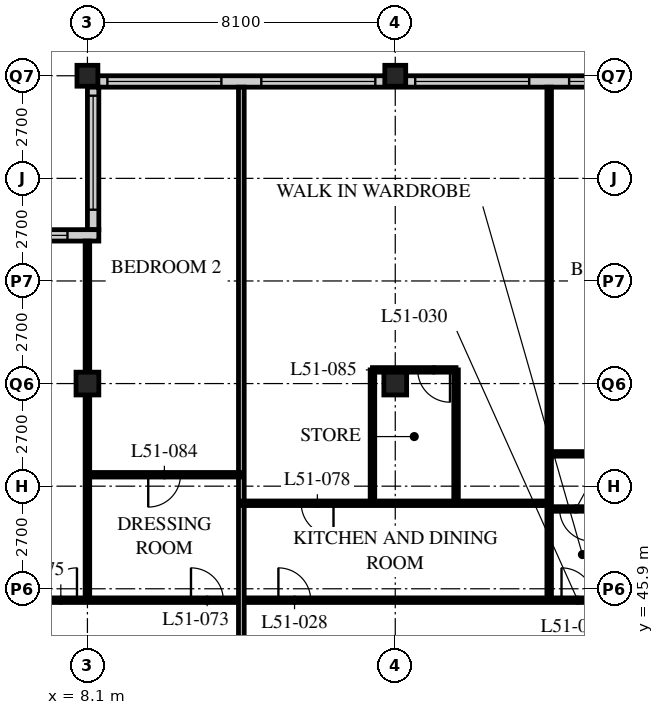
"""IFC4 building model, lengths in metres.
Left out: names, types, materials, properties, quantities, classifications, styles, units other than length and angle.
Written with IfcOpenShell. Run it as: python <this file> out.ifc"""

import sys

from ifc_helpers import new_model, si_unit, direction, frame, frame_2d, origin, origin_2d, place, context, subcontext, project, spatial, rectangle, hollow_rectangle, extrude, element, fill, save


model = new_model("IFC4")
c1 = context("Model", 3, precision=1e-05, world=origin(), true_north=direction((0.0, 1.0)))
c2 = subcontext(c1, "Body", "Model", "MODEL_VIEW")
j1 = project(units=[si_unit("LENGTHUNIT", "METRE"), si_unit("PLANEANGLEUNIT", "RADIAN")], contexts=[c1])
p1 = place(None, origin())
s1 = spatial("IfcSite", under=j1, at=p1, CompositionType="ELEMENT")
p2 = place(p1, origin())
s2 = spatial("IfcBuilding", under=s1, at=p2, CompositionType="ELEMENT")
p3 = place(p2, frame((0.0, 0.0, 199.2)))
s3 = spatial("IfcBuildingStorey", under=s2, at=p3, CompositionType="ELEMENT", Elevation=199.2)
p4 = place(p3, frame((8.1, 51.3, 0.0), z_axis=(0.0, 0.0, 1.0), x_axis=(1.0, 0.0, 0.0)))
e1 = element("IfcColumn", 1, at=p4, inside=s3, PredefinedType="COLUMN", context=c2, shape_type="SweptSolid", body=[
    extrude(hollow_rectangle(XDim=0.6, YDim=0.6, WallThickness=0.05, at=origin_2d()), origin(), (0.0, 0.0, 1.0), 3.6),
])
p5 = place(p3, frame((8.1, 59.4, 0.0), z_axis=(0.0, 0.0, 1.0), x_axis=(1.0, 0.0, 0.0)))
e2 = element("IfcColumn", 2, at=p5, inside=s3, PredefinedType="COLUMN", context=c2, shape_type="SweptSolid", body=[
    extrude(hollow_rectangle(XDim=0.55, YDim=0.55, WallThickness=0.045, at=origin_2d()), origin(), (0.0, 0.0, 1.0), 3.6),
])
p6 = place(p3, frame((16.2, 51.3, 0.0), z_axis=(0.0, 0.0, 1.0), x_axis=(1.0, 0.0, 0.0)))
e3 = element("IfcColumn", 3, at=p6, inside=s3, PredefinedType="COLUMN", context=c2, shape_type="SweptSolid", body=[
    extrude(hollow_rectangle(XDim=0.6, YDim=0.6, WallThickness=0.05, at=origin_2d()), origin(), (0.0, 0.0, 1.0), 3.6),
])
p7 = place(p3, frame((16.2, 59.4, 0.0), z_axis=(0.0, 0.0, 1.0), x_axis=(1.0, 0.0, 0.0)))
e4 = element("IfcColumn", 4, at=p7, inside=s3, PredefinedType="COLUMN", context=c2, shape_type="SweptSolid", body=[
    extrude(hollow_rectangle(XDim=0.55, YDim=0.55, WallThickness=0.045, at=origin_2d()), origin(), (0.0, 0.0, 1.0), 3.6),
])
p8 = place(p3, frame((48.3, 59.25, 0.0), z_axis=(0.0, 0.0, 1.0), x_axis=(-1.0, 0.0, 0.0)))
e5 = element("IfcWall", 5, at=p8, inside=s3, PredefinedType="SOLIDWALL", context=c2, shape_type="SweptSolid", body=[
    extrude(rectangle(XDim=40.2, YDim=0.3, at=frame_2d((20.1, 0.0))), origin(), (0.0, 0.0, 1.0), 3.39),
])
p9 = place(p8, frame((0.225, 0.0, 0.6)))
e6 = element("IfcOpeningElement", 6, at=p9, cuts=e5, PredefinedType="OPENING", context=c2, shape_type="SweptSolid", body=[
    extrude(rectangle(XDim=3.0, YDim=2.4, at=frame_2d((1.5, 1.2))), frame((0.0, 0.16, 0.0), z_axis=(0.0, -1.0, 0.0), x_axis=(1.0, 0.0, 0.0)), (0.0, 0.0, 1.0), 0.32),
])
p10 = place(p8, frame((4.275, 0.0, 0.6)))
e7 = element("IfcOpeningElement", 7, at=p10, cuts=e5, PredefinedType="OPENING", context=c2, shape_type="SweptSolid", body=[
    extrude(rectangle(XDim=3.0, YDim=2.4, at=frame_2d((1.5, 1.2))), frame((0.0, 0.16, 0.0), z_axis=(0.0, -1.0, 0.0), x_axis=(1.0, 0.0, 0.0)), (0.0, 0.0, 1.0), 0.32),
])
p11 = place(p8, frame((8.325, 0.0, 0.6)))
e8 = element("IfcOpeningElement", 8, at=p11, cuts=e5, PredefinedType="OPENING", context=c2, shape_type="SweptSolid", body=[
    extrude(rectangle(XDim=3.0, YDim=2.4, at=frame_2d((1.5, 1.2))), frame((0.0, 0.16, 0.0), z_axis=(0.0, -1.0, 0.0), x_axis=(1.0, 0.0, 0.0)), (0.0, 0.0, 1.0), 0.32),
])
p12 = place(p8, frame((12.375, 0.0, 0.6)))
e9 = element("IfcOpeningElement", 9, at=p12, cuts=e5, PredefinedType="OPENING", context=c2, shape_type="SweptSolid", body=[
    extrude(rectangle(XDim=3.0, YDim=2.4, at=frame_2d((1.5, 1.2))), frame((0.0, 0.16, 0.0), z_axis=(0.0, -1.0, 0.0), x_axis=(1.0, 0.0, 0.0)), (0.0, 0.0, 1.0), 0.32),
])
p13 = place(p8, frame((16.425, 0.0, 0.6)))
e10 = element("IfcOpeningElement", 10, at=p13, cuts=e5, PredefinedType="OPENING", context=c2, shape_type="SweptSolid", body=[
    extrude(rectangle(XDim=3.0, YDim=2.4, at=frame_2d((1.5, 1.2))), frame((0.0, 0.16, 0.0), z_axis=(0.0, -1.0, 0.0), x_axis=(1.0, 0.0, 0.0)), (0.0, 0.0, 1.0), 0.32),
])
p14 = place(p8, frame((20.475, 0.0, 0.6)))
e11 = element("IfcOpeningElement", 11, at=p14, cuts=e5, PredefinedType="OPENING", context=c2, shape_type="SweptSolid", body=[
    extrude(rectangle(XDim=3.0, YDim=2.4, at=frame_2d((1.5, 1.2))), frame((0.0, 0.16, 0.0), z_axis=(0.0, -1.0, 0.0), x_axis=(1.0, 0.0, 0.0)), (0.0, 0.0, 1.0), 0.32),
])
p15 = place(p8, frame((24.525, 0.0, 0.6)))
e12 = element("IfcOpeningElement", 12, at=p15, cuts=e5, PredefinedType="OPENING", context=c2, shape_type="SweptSolid", body=[
    extrude(rectangle(XDim=3.0, YDim=2.4, at=frame_2d((1.5, 1.2))), frame((0.0, 0.16, 0.0), z_axis=(0.0, -1.0, 0.0), x_axis=(1.0, 0.0, 0.0)), (0.0, 0.0, 1.0), 0.32),
])
p16 = place(p8, frame((28.575, 0.0, 0.6)))
e13 = element("IfcOpeningElement", 13, at=p16, cuts=e5, PredefinedType="OPENING", context=c2, shape_type="SweptSolid", body=[
    extrude(rectangle(XDim=3.0, YDim=2.4, at=frame_2d((1.5, 1.2))), frame((0.0, 0.16, 0.0), z_axis=(0.0, -1.0, 0.0), x_axis=(1.0, 0.0, 0.0)), (0.0, 0.0, 1.0), 0.32),
])
p17 = place(p8, frame((32.625, 0.0, 0.6)))
e14 = element("IfcOpeningElement", 14, at=p17, cuts=e5, PredefinedType="OPENING", context=c2, shape_type="SweptSolid", body=[
    extrude(rectangle(XDim=3.0, YDim=2.4, at=frame_2d((1.5, 1.2))), frame((0.0, 0.16, 0.0), z_axis=(0.0, -1.0, 0.0), x_axis=(1.0, 0.0, 0.0)), (0.0, 0.0, 1.0), 0.32),
])
p18 = place(p8, frame((36.675, 0.0, 0.6)))
e15 = element("IfcOpeningElement", 15, at=p18, cuts=e5, PredefinedType="OPENING", context=c2, shape_type="SweptSolid", body=[
    extrude(rectangle(XDim=3.0, YDim=2.4, at=frame_2d((1.5, 1.2))), frame((0.0, 0.16, 0.0), z_axis=(0.0, -1.0, 0.0), x_axis=(1.0, 0.0, 0.0)), (0.0, 0.0, 1.0), 0.32),
])
p19 = place(p3, frame((8.25, 59.1, 0.0), z_axis=(0.0, 0.0, 1.0), x_axis=(0.0, -1.0, 0.0)))
e16 = element("IfcWall", 16, at=p19, inside=s3, PredefinedType="SOLIDWALL", context=c2, shape_type="SweptSolid", body=[
    extrude(rectangle(XDim=3.75, YDim=0.3, at=frame_2d((1.875, 0.0))), origin(), (0.0, 0.0, 1.0), 3.39),
])
p20 = place(p19, frame((0.225, 0.0, 0.6)))
e17 = element("IfcOpeningElement", 17, at=p20, cuts=e16, PredefinedType="OPENING", context=c2, shape_type="SweptSolid", body=[
    extrude(rectangle(XDim=3.0, YDim=2.0, at=frame_2d((1.5, 1.0))), frame((0.0, 0.16, 0.0), z_axis=(0.0, -1.0, 0.0), x_axis=(1.0, 0.0, 0.0)), (0.0, 0.0, 1.0), 0.32),
])
p21 = place(p3, frame((8.4, 55.2, 0.0), z_axis=(0.0, 0.0, 1.0), x_axis=(-1.0, 0.0, 0.0)))
e18 = element("IfcWall", 18, at=p21, inside=s3, PredefinedType="SOLIDWALL", context=c2, shape_type="SweptSolid", body=[
    extrude(rectangle(XDim=4.35, YDim=0.3, at=frame_2d((2.175, 0.0))), origin(), (0.0, 0.0, 1.0), 3.39),
])
p22 = place(p21, frame((0.825, 0.0, 0.6)))
e19 = element("IfcOpeningElement", 19, at=p22, cuts=e18, PredefinedType="OPENING", context=c2, shape_type="SweptSolid", body=[
    extrude(rectangle(XDim=3.0, YDim=2.0, at=frame_2d((1.5, 1.0))), frame((0.0, 0.16, 0.0), z_axis=(0.0, -1.0, 0.0), x_axis=(1.0, 0.0, 0.0)), (0.0, 0.0, 1.0), 0.32),
])
p23 = place(p3, frame((20.25, 45.6, 0.0), z_axis=(0.0, 0.0, 1.0), x_axis=(0.0, 1.0, 0.0)))
e20 = element("IfcWall", 20, at=p23, inside=s3, PredefinedType="PARTITIONING", context=c2, shape_type="SweptSolid", body=[
    extrude(rectangle(XDim=13.5, YDim=0.12, at=frame_2d((6.75, 0.0))), origin(), (0.0, 0.0, 1.0), 3.39),
])
p24 = place(p3, frame((4.1, 45.6, 0.0), z_axis=(0.0, 0.0, 1.0), x_axis=(1.0, 0.0, 0.0)))
e21 = element("IfcWall", 21, at=p24, inside=s3, PredefinedType="PARTITIONING", context=c2, shape_type="SweptSolid", body=[
    extrude(rectangle(XDim=48.5, YDim=0.12, at=frame_2d((24.25, 0.0))), origin(), (0.0, 0.0, 1.0), 3.39),
])
p25 = place(p24, frame((9.025, 0.0, 0.0)))
e22 = element("IfcOpeningElement", 22, at=p25, cuts=e21, PredefinedType="OPENING", context=c2, shape_type="SweptSolid", body=[
    extrude(rectangle(XDim=0.85, YDim=2.1, at=frame_2d((0.425, 1.05))), frame((0.0, 0.07, 0.0), z_axis=(0.0, -1.0, 0.0), x_axis=(1.0, 0.0, 0.0)), (0.0, 0.0, 1.0), 0.14),
])
p26 = place(p24, frame((16.475, 0.0, 0.0)))
e23 = element("IfcOpeningElement", 23, at=p26, cuts=e21, PredefinedType="OPENING", context=c2, shape_type="SweptSolid", body=[
    extrude(rectangle(XDim=0.85, YDim=2.1, at=frame_2d((0.425, 1.05))), frame((0.0, 0.07, 0.0), z_axis=(0.0, -1.0, 0.0), x_axis=(1.0, 0.0, 0.0)), (0.0, 0.0, 1.0), 0.14),
])
p27 = place(p24, frame((20.525, 0.0, 0.0)))
e24 = element("IfcOpeningElement", 24, at=p27, cuts=e21, PredefinedType="OPENING", context=c2, shape_type="SweptSolid", body=[
    extrude(rectangle(XDim=0.85, YDim=2.1, at=frame_2d((0.425, 1.05))), frame((0.0, 0.07, 0.0), z_axis=(0.0, -1.0, 0.0), x_axis=(1.0, 0.0, 0.0)), (0.0, 0.0, 1.0), 0.14),
])
p28 = place(p24, frame((25.225, 0.0, 0.0)))
e25 = element("IfcOpeningElement", 25, at=p28, cuts=e21, PredefinedType="OPENING", context=c2, shape_type="SweptSolid", body=[
    extrude(rectangle(XDim=0.85, YDim=2.1, at=frame_2d((0.425, 1.05))), frame((0.0, 0.07, 0.0), z_axis=(0.0, -1.0, 0.0), x_axis=(1.0, 0.0, 0.0)), (0.0, 0.0, 1.0), 0.14),
])
p29 = place(p24, frame((28.625, 0.0, 0.0)))
e26 = element("IfcOpeningElement", 26, at=p29, cuts=e21, PredefinedType="OPENING", context=c2, shape_type="SweptSolid", body=[
    extrude(rectangle(XDim=0.85, YDim=2.1, at=frame_2d((0.425, 1.05))), frame((0.0, 0.07, 0.0), z_axis=(0.0, -1.0, 0.0), x_axis=(1.0, 0.0, 0.0)), (0.0, 0.0, 1.0), 0.14),
])
p30 = place(p24, frame((33.325, 0.0, 0.0)))
e27 = element("IfcOpeningElement", 27, at=p30, cuts=e21, PredefinedType="OPENING", context=c2, shape_type="SweptSolid", body=[
    extrude(rectangle(XDim=0.85, YDim=2.1, at=frame_2d((0.425, 1.05))), frame((0.0, 0.07, 0.0), z_axis=(0.0, -1.0, 0.0), x_axis=(1.0, 0.0, 0.0)), (0.0, 0.0, 1.0), 0.14),
])
p31 = place(p24, frame((36.725, 0.0, 0.0)))
e28 = element("IfcOpeningElement", 28, at=p31, cuts=e21, PredefinedType="OPENING", context=c2, shape_type="SweptSolid", body=[
    extrude(rectangle(XDim=0.85, YDim=2.1, at=frame_2d((0.425, 1.05))), frame((0.0, 0.07, 0.0), z_axis=(0.0, -1.0, 0.0), x_axis=(1.0, 0.0, 0.0)), (0.0, 0.0, 1.0), 0.14),
])
p32 = place(p24, frame((40.925, 0.0, 0.0)))
e29 = element("IfcOpeningElement", 29, at=p32, cuts=e21, PredefinedType="OPENING", context=c2, shape_type="SweptSolid", body=[
    extrude(rectangle(XDim=0.85, YDim=2.1, at=frame_2d((0.425, 1.05))), frame((0.0, 0.07, 0.0), z_axis=(0.0, -1.0, 0.0), x_axis=(1.0, 0.0, 0.0)), (0.0, 0.0, 1.0), 0.14),
])
p33 = place(p24, frame((44.775, 0.0, 0.0)))
e30 = element("IfcOpeningElement", 30, at=p33, cuts=e21, PredefinedType="OPENING", context=c2, shape_type="SweptSolid", body=[
    extrude(rectangle(XDim=0.85, YDim=2.1, at=frame_2d((0.425, 1.05))), frame((0.0, 0.07, 0.0), z_axis=(0.0, -1.0, 0.0), x_axis=(1.0, 0.0, 0.0)), (0.0, 0.0, 1.0), 0.14),
])
p34 = place(p24, frame((6.725, 0.0, 0.0)))
e31 = element("IfcOpeningElement", 31, at=p34, cuts=e21, PredefinedType="OPENING", context=c2, shape_type="SweptSolid", body=[
    extrude(rectangle(XDim=0.85, YDim=2.1, at=frame_2d((0.425, 1.05))), frame((0.0, 0.07, 0.0), z_axis=(0.0, -1.0, 0.0), x_axis=(1.0, 0.0, 0.0)), (0.0, 0.0, 1.0), 0.14),
])
p35 = place(p24, frame((2.875, 0.0, 0.0)))
e32 = element("IfcOpeningElement", 32, at=p35, cuts=e21, PredefinedType="OPENING", context=c2, shape_type="SweptSolid", body=[
    extrude(rectangle(XDim=0.85, YDim=2.1, at=frame_2d((0.425, 1.05))), frame((0.0, 0.07, 0.0), z_axis=(0.0, -1.0, 0.0), x_axis=(1.0, 0.0, 0.0)), (0.0, 0.0, 1.0), 0.14),
])
p36 = place(p3, frame((8.1, 45.6, 0.0), z_axis=(0.0, 0.0, 1.0), x_axis=(0.0, 1.0, 0.0)))
e33 = element("IfcWall", 33, at=p36, inside=s3, PredefinedType="PARTITIONING", context=c2, shape_type="SweptSolid", body=[
    extrude(rectangle(XDim=9.45, YDim=0.12, at=frame_2d((4.725, 0.0))), origin(), (0.0, 0.0, 1.0), 2.778),
])
p37 = place(p3, frame((12.15, 43.2, 0.0), z_axis=(0.0, 0.0, 1.0), x_axis=(0.0, 1.0, 0.0)))
e34 = element("IfcWall", 34, at=p37, inside=s3, PredefinedType="PARTITIONING", context=c2, shape_type="SweptSolid", body=[
    extrude(rectangle(XDim=15.9, YDim=0.15, at=frame_2d((7.95, 0.0))), origin(), (0.0, 0.0, 1.0), 3.39),
])
p38 = place(p3, frame((20.25, 48.0, 0.0), z_axis=(0.0, 0.0, 1.0), x_axis=(1.0, 0.0, 0.0)))
e35 = element("IfcWall", 35, at=p38, inside=s3, PredefinedType="PARTITIONING", context=c2, shape_type="SweptSolid", body=[
    extrude(rectangle(XDim=1.76, YDim=0.12, at=frame_2d((0.88, 0.0))), origin(), (0.0, 0.0, 1.0), 3.39),
])
p39 = place(p38, frame((0.275, 0.0, 0.0)))
e36 = element("IfcOpeningElement", 36, at=p39, cuts=e35, PredefinedType="OPENING", context=c2, shape_type="SweptSolid", body=[
    extrude(rectangle(XDim=0.85, YDim=2.1, at=frame_2d((0.425, 1.05))), frame((0.0, 0.07, 0.0), z_axis=(0.0, -1.0, 0.0), x_axis=(1.0, 0.0, 0.0)), (0.0, 0.0, 1.0), 0.14),
])
p40 = place(p3, frame((12.15, 48.15, 0.0), z_axis=(0.0, 0.0, 1.0), x_axis=(1.0, 0.0, 0.0)))
e37 = element("IfcWall", 37, at=p40, inside=s3, PredefinedType="PARTITIONING", context=c2, shape_type="SweptSolid", body=[
    extrude(rectangle(XDim=8.1, YDim=0.12, at=frame_2d((4.05, 0.0))), origin(), (0.0, 0.0, 1.0), 3.39),
])
p41 = place(p40, frame((1.575, 0.0, 0.0)))
e38 = element("IfcOpeningElement", 38, at=p41, cuts=e37, PredefinedType="OPENING", context=c2, shape_type="SweptSolid", body=[
    extrude(rectangle(XDim=0.85, YDim=2.1, at=frame_2d((0.425, 1.05))), frame((0.0, 0.07, 0.0), z_axis=(0.0, -1.0, 0.0), x_axis=(1.0, 0.0, 0.0)), (0.0, 0.0, 1.0), 0.14),
])
p42 = place(p3, frame((20.25, 49.45, 0.0), z_axis=(0.0, 0.0, 1.0), x_axis=(1.0, 0.0, 0.0)))
e39 = element("IfcWall", 39, at=p42, inside=s3, PredefinedType="PARTITIONING", context=c2, shape_type="SweptSolid", body=[
    extrude(rectangle(XDim=4.05, YDim=0.12, at=frame_2d((2.025, 0.0))), origin(), (0.0, 0.0, 1.0), 3.39),
])
p43 = place(p42, frame((1.6, 0.0, 0.0)))
e40 = element("IfcOpeningElement", 40, at=p43, cuts=e39, PredefinedType="OPENING", context=c2, shape_type="SweptSolid", body=[
    extrude(rectangle(XDim=0.85, YDim=2.1, at=frame_2d((0.425, 1.05))), frame((0.0, 0.07, 0.0), z_axis=(0.0, -1.0, 0.0), x_axis=(1.0, 0.0, 0.0)), (0.0, 0.0, 1.0), 0.14),
])
p44 = place(p3, frame((8.1, 48.9, 0.0), z_axis=(0.0, 0.0, 1.0), x_axis=(1.0, 0.0, 0.0)))
e41 = element("IfcWall", 41, at=p44, inside=s3, PredefinedType="PARTITIONING", context=c2, shape_type="SweptSolid", body=[
    extrude(rectangle(XDim=4.05, YDim=0.12, at=frame_2d((2.025, 0.0))), origin(), (0.0, 0.0, 1.0), 3.39),
])
p45 = place(p44, frame((1.6, 0.0, 0.0)))
e42 = element("IfcOpeningElement", 42, at=p45, cuts=e41, PredefinedType="OPENING", context=c2, shape_type="SweptSolid", body=[
    extrude(rectangle(XDim=0.85, YDim=2.1, at=frame_2d((0.425, 1.05))), frame((0.0, 0.07, 0.0), z_axis=(0.0, -1.0, 0.0), x_axis=(1.0, 0.0, 0.0)), (0.0, 0.0, 1.0), 0.14),
])
for number, where, z_axis, x_axis in (
    (43, (15.6, 48.15, 0.0), (0.0, 0.0, 1.0), (0.0, 1.0, 0.0)),
    (44, (17.8, 48.15, 0.0), (0.0, 0.0, 1.0), (0.0, 1.0, 0.0)),
):
    element("IfcWall", number, at=place(p3, frame(where, z_axis=z_axis, x_axis=x_axis)), inside=s3, PredefinedType="PARTITIONING", context=c2, shape_type="SweptSolid", body=[
        extrude(rectangle(XDim=3.51, YDim=0.12, at=frame_2d((1.755, 0.0))), origin(), (0.0, 0.0, 1.0), 3.39),
    ])
p46 = place(p3, frame((15.6, 51.66, 0.0), z_axis=(0.0, 0.0, 1.0), x_axis=(1.0, 0.0, 0.0)))
e45 = element("IfcWall", 45, at=p46, inside=s3, PredefinedType="PARTITIONING", context=c2, shape_type="SweptSolid", body=[
    extrude(rectangle(XDim=2.2, YDim=0.12, at=frame_2d((1.1, 0.0))), origin(), (0.0, 0.0, 1.0), 3.39),
])
p47 = place(p46, frame((1.19, 0.0, 0.0)))
e46 = element("IfcOpeningElement", 46, at=p47, cuts=e45, PredefinedType="OPENING", context=c2, shape_type="SweptSolid", body=[
    extrude(rectangle(XDim=0.85, YDim=2.1, at=frame_2d((0.425, 1.05))), frame((0.0, 0.07, 0.0), z_axis=(0.0, -1.0, 0.0), x_axis=(1.0, 0.0, 0.0)), (0.0, 0.0, 1.0), 0.14),
])
p48 = place(p15, origin())
e47 = element("IfcWindow", 47, at=p48, inside=s3, PartitioningType="SINGLE_PANEL", PredefinedType="WINDOW", context=c2, shape_type="SweptSolid", body=[
    extrude(rectangle(XDim=3.0, YDim=2.4, at=frame_2d((1.5, 1.2))), frame((0.0, 0.03, 0.0), z_axis=(0.0, -1.0, 0.0), x_axis=(1.0, 0.0, 0.0)), (0.0, 0.0, 1.0), 0.06),
])
fill(e12, e47)
p49 = place(p16, origin())
e48 = element("IfcWindow", 48, at=p49, inside=s3, PartitioningType="SINGLE_PANEL", PredefinedType="WINDOW", context=c2, shape_type="SweptSolid", body=[
    extrude(rectangle(XDim=3.0, YDim=2.4, at=frame_2d((1.5, 1.2))), frame((0.0, 0.03, 0.0), z_axis=(0.0, -1.0, 0.0), x_axis=(1.0, 0.0, 0.0)), (0.0, 0.0, 1.0), 0.06),
])
fill(e13, e48)
p50 = place(p17, origin())
e49 = element("IfcWindow", 49, at=p50, inside=s3, PartitioningType="SINGLE_PANEL", PredefinedType="WINDOW", context=c2, shape_type="SweptSolid", body=[
    extrude(rectangle(XDim=3.0, YDim=2.4, at=frame_2d((1.5, 1.2))), frame((0.0, 0.03, 0.0), z_axis=(0.0, -1.0, 0.0), x_axis=(1.0, 0.0, 0.0)), (0.0, 0.0, 1.0), 0.06),
])
fill(e14, e49)
p51 = place(p18, origin())
e50 = element("IfcWindow", 50, at=p51, inside=s3, PartitioningType="SINGLE_PANEL", PredefinedType="WINDOW", context=c2, shape_type="SweptSolid", body=[
    extrude(rectangle(XDim=3.0, YDim=2.4, at=frame_2d((1.5, 1.2))), frame((0.0, 0.03, 0.0), z_axis=(0.0, -1.0, 0.0), x_axis=(1.0, 0.0, 0.0)), (0.0, 0.0, 1.0), 0.06),
])
fill(e15, e50)
p52 = place(p20, origin())
e51 = element("IfcWindow", 51, at=p52, inside=s3, PartitioningType="SINGLE_PANEL", PredefinedType="WINDOW", context=c2, shape_type="SweptSolid", body=[
    extrude(rectangle(XDim=3.0, YDim=2.0, at=frame_2d((1.5, 1.0))), frame((0.0, 0.03, 0.0), z_axis=(0.0, -1.0, 0.0), x_axis=(1.0, 0.0, 0.0)), (0.0, 0.0, 1.0), 0.06),
])
fill(e17, e51)
p53 = place(p22, origin())
e52 = element("IfcWindow", 52, at=p53, inside=s3, PartitioningType="SINGLE_PANEL", PredefinedType="WINDOW", context=c2, shape_type="SweptSolid", body=[
    extrude(rectangle(XDim=3.0, YDim=2.0, at=frame_2d((1.5, 1.0))), frame((0.0, 0.03, 0.0), z_axis=(0.0, -1.0, 0.0), x_axis=(1.0, 0.0, 0.0)), (0.0, 0.0, 1.0), 0.06),
])
fill(e19, e52)
p54 = place(p25, origin())
e53 = element("IfcDoor", 53, at=p54, inside=s3, OperationType="SINGLE_SWING_LEFT", PredefinedType="DOOR", context=c2, shape_type="SweptSolid", body=[
    extrude(rectangle(XDim=0.85, YDim=2.1, at=frame_2d((0.425, 1.05))), frame((0.0, 0.025, 0.0), z_axis=(0.0, -1.0, 0.0), x_axis=(1.0, 0.0, 0.0)), (0.0, 0.0, 1.0), 0.05),
])
fill(e22, e53)
p55 = place(p26, origin())
e54 = element("IfcDoor", 54, at=p55, inside=s3, OperationType="SINGLE_SWING_LEFT", PredefinedType="DOOR", context=c2, shape_type="SweptSolid", body=[
    extrude(rectangle(XDim=0.85, YDim=2.1, at=frame_2d((0.425, 1.05))), frame((0.0, 0.025, 0.0), z_axis=(0.0, -1.0, 0.0), x_axis=(1.0, 0.0, 0.0)), (0.0, 0.0, 1.0), 0.05),
])
fill(e23, e54)
p56 = place(p34, origin())
e55 = element("IfcDoor", 55, at=p56, inside=s3, OperationType="SINGLE_SWING_LEFT", PredefinedType="DOOR", context=c2, shape_type="SweptSolid", body=[
    extrude(rectangle(XDim=0.85, YDim=2.1, at=frame_2d((0.425, 1.05))), frame((0.0, 0.025, 0.0), z_axis=(0.0, -1.0, 0.0), x_axis=(1.0, 0.0, 0.0)), (0.0, 0.0, 1.0), 0.05),
])
fill(e31, e55)
p57 = place(p35, origin())
e56 = element("IfcDoor", 56, at=p57, inside=s3, OperationType="SINGLE_SWING_RIGHT", PredefinedType="DOOR", context=c2, shape_type="SweptSolid", body=[
    extrude(rectangle(XDim=0.85, YDim=2.1, at=frame_2d((0.425, 1.05))), frame((0.0, 0.025, 0.0), z_axis=(0.0, -1.0, 0.0), x_axis=(1.0, 0.0, 0.0)), (0.0, 0.0, 1.0), 0.05),
])
fill(e32, e56)
p58 = place(p39, origin())
e57 = element("IfcDoor", 57, at=p58, inside=s3, OperationType="SINGLE_SWING_LEFT", PredefinedType="DOOR", context=c2, shape_type="SweptSolid", body=[
    extrude(rectangle(XDim=0.85, YDim=2.1, at=frame_2d((0.425, 1.05))), frame((0.0, 0.025, 0.0), z_axis=(0.0, -1.0, 0.0), x_axis=(1.0, 0.0, 0.0)), (0.0, 0.0, 1.0), 0.05),
])
fill(e36, e57)
p59 = place(p41, origin())
e58 = element("IfcDoor", 58, at=p59, inside=s3, OperationType="SINGLE_SWING_LEFT", PredefinedType="DOOR", context=c2, shape_type="SweptSolid", body=[
    extrude(rectangle(XDim=0.85, YDim=2.1, at=frame_2d((0.425, 1.05))), frame((0.0, 0.025, 0.0), z_axis=(0.0, -1.0, 0.0), x_axis=(1.0, 0.0, 0.0)), (0.0, 0.0, 1.0), 0.05),
])
fill(e38, e58)
p60 = place(p45, origin())
e59 = element("IfcDoor", 59, at=p60, inside=s3, OperationType="SINGLE_SWING_RIGHT", PredefinedType="DOOR", context=c2, shape_type="SweptSolid", body=[
    extrude(rectangle(XDim=0.85, YDim=2.1, at=frame_2d((0.425, 1.05))), frame((0.0, 0.025, 0.0), z_axis=(0.0, -1.0, 0.0), x_axis=(1.0, 0.0, 0.0)), (0.0, 0.0, 1.0), 0.05),
])
fill(e42, e59)
p61 = place(p47, origin())
e60 = element("IfcDoor", 60, at=p61, inside=s3, OperationType="SINGLE_SWING_LEFT", PredefinedType="DOOR", context=c2, shape_type="SweptSolid", body=[
    extrude(rectangle(XDim=0.85, YDim=2.1, at=frame_2d((0.425, 1.05))), frame((0.0, 0.025, 0.0), z_axis=(0.0, -1.0, 0.0), x_axis=(1.0, 0.0, 0.0)), (0.0, 0.0, 1.0), 0.05),
])
fill(e46, e60)
save(model, sys.argv[1])
